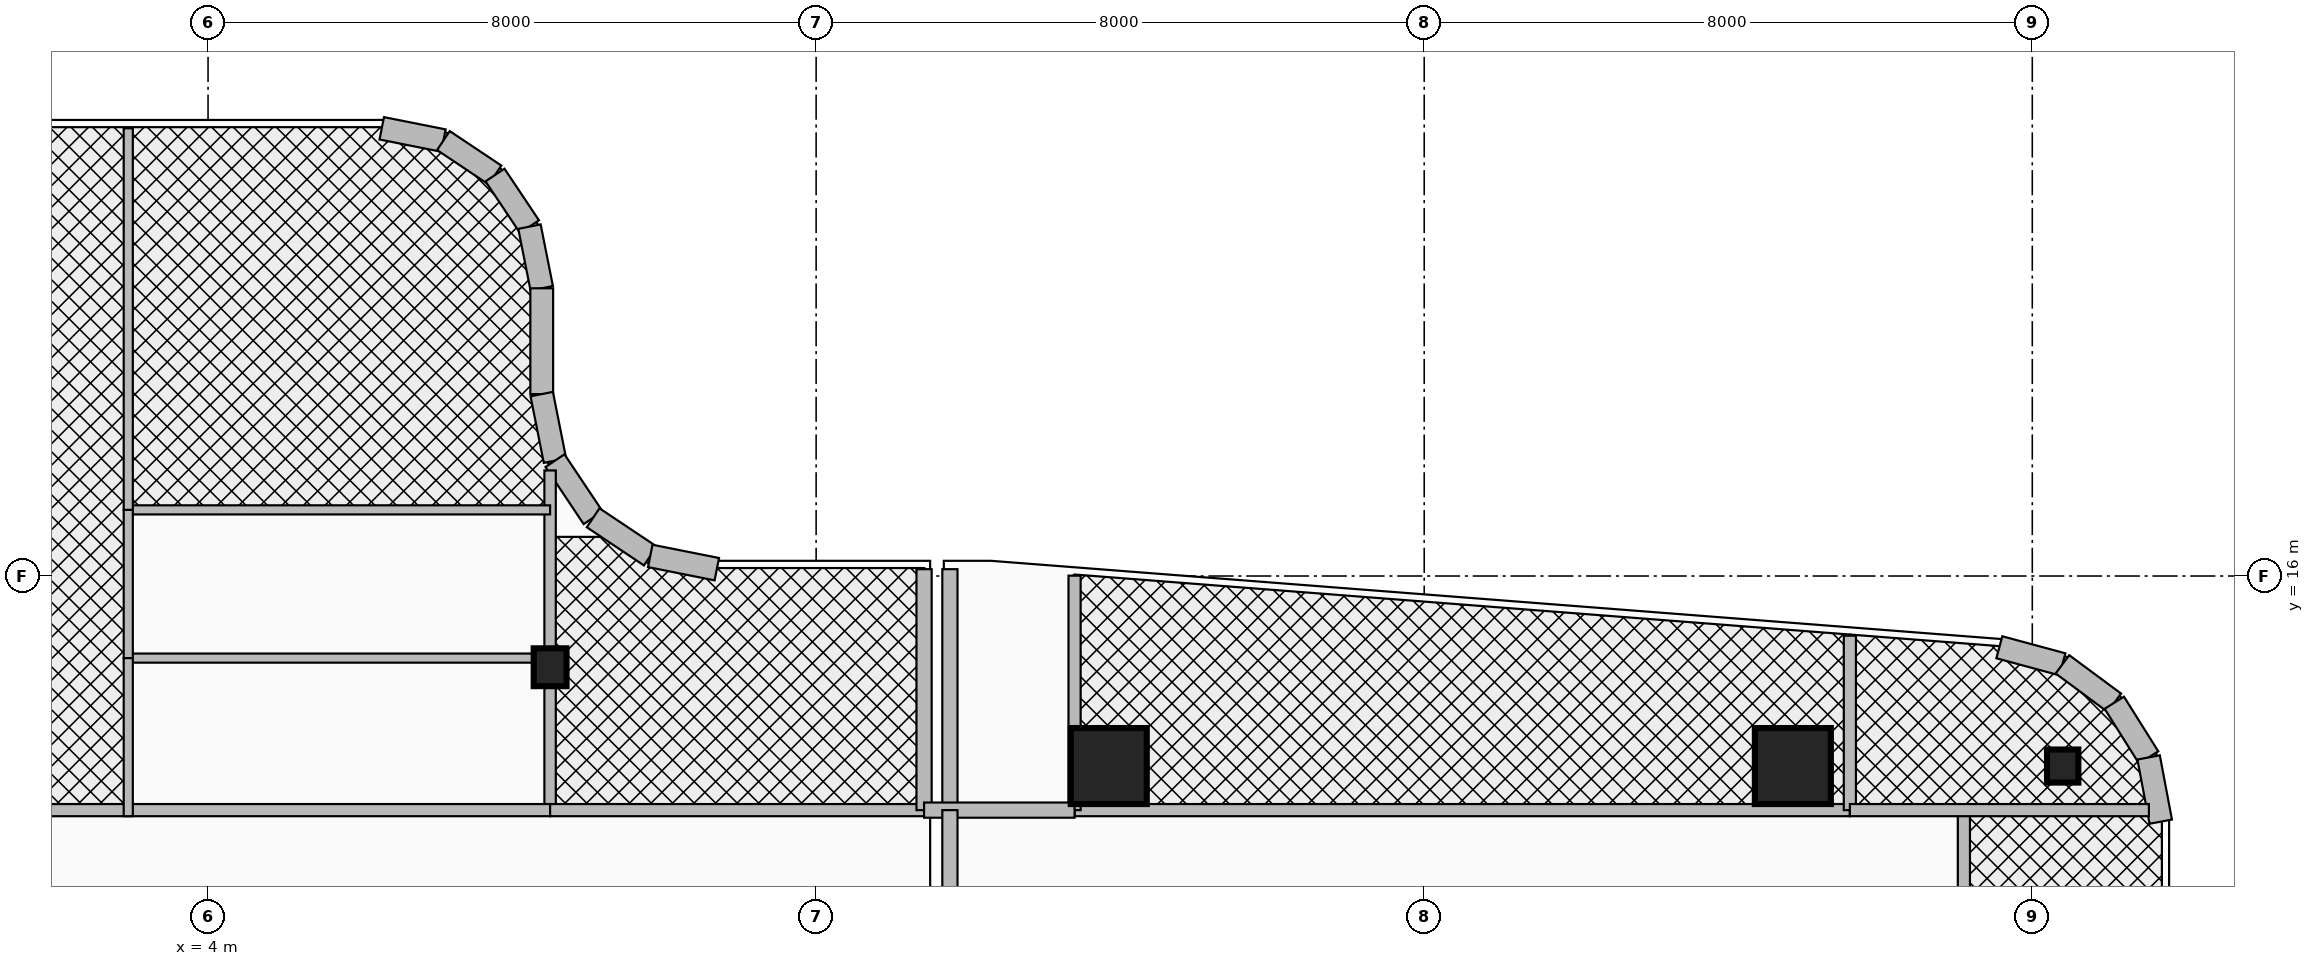
"""IFC4 building model, lengths in metres.
Left out: names, types, materials, properties, quantities, classifications, styles, units other than length and angle.
Written with IfcOpenShell. Run it as: python <this file> out.ifc"""

import sys

from ifc_helpers import new_model, si_unit, direction, frame, frame_2d, origin, origin_2d, place, context, subcontext, project, spatial, rectangle, i_section, extrude, source, transform, mapped, element, fill, save


model = new_model("IFC4")
c1 = context("Model", 3, precision=1e-05, world=origin(), true_north=direction((0.0, 1.0)))
c2 = subcontext(c1, "Body", "Model", "MODEL_VIEW")
j1 = project(units=[si_unit("LENGTHUNIT", "METRE"), si_unit("PLANEANGLEUNIT", "RADIAN")], contexts=[c1])
p1 = place(None, origin())
s1 = spatial("IfcSite", under=j1, at=p1, CompositionType="ELEMENT")
p2 = place(p1, origin())
s2 = spatial("IfcBuilding", under=s1, at=p2, CompositionType="ELEMENT")
p3 = place(p2, frame((0.0, 0.0, 180.5)))
s3 = spatial("IfcBuildingStorey", under=s2, at=p3, CompositionType="ELEMENT", Elevation=180.5)
m1 = source(origin(), c2, "Body", "SweptSolid", [
    extrude(rectangle(XDim=1.0, YDim=1.0, at=origin_2d()), origin(), (0.0, 0.0, 1.0), 3.95),
])
for number, where, z_axis, x_axis in (
    (1, (15.85, 13.5, 0.0), (0.0, 0.0, 1.0), (1.0, 0.0, 0.0)),
    (2, (24.85, 13.5, 0.0), (0.0, 0.0, 1.0), (1.0, 0.0, 0.0)),
):
    element("IfcColumn", number, at=place(p3, frame(where, z_axis=z_axis, x_axis=x_axis)), inside=s3, PredefinedType="COLUMN", context=c2, shape_type="MappedRepresentation", body=[
        mapped(m1, transform((0.0, 0.0, 0.0), x_axis=(1.0, 0.0, 0.0), y_axis=(0.0, 1.0, 0.0), z_axis=(0.0, 0.0, 1.0), scale=1.0)),
    ])
m2 = source(origin(), c2, "Body", "SweptSolid", [
    extrude(i_section(OverallWidth=0.412, OverallDepth=0.435, WebThickness=0.036, FlangeThickness=0.057, at=origin_2d()), origin(), (0.0, 0.0, 1.0), 3.95),
])
p4 = place(p3, frame((28.4, 13.5, 0.0), z_axis=(0.0, 0.0, 1.0), x_axis=(1.0, 0.0, 0.0)))
e3 = element("IfcColumn", 3, at=p4, inside=s3, PredefinedType="COLUMN", context=c2, shape_type="MappedRepresentation", body=[
    mapped(m2, transform((0.0, 0.0, 0.0), x_axis=(1.0, 0.0, 0.0), y_axis=(0.0, 1.0, 0.0), z_axis=(0.0, 0.0, 1.0), scale=1.0)),
])
m3 = source(origin(), c2, "Body", "SweptSolid", [
    extrude(i_section(OverallWidth=0.432, OverallDepth=0.498, WebThickness=0.056, FlangeThickness=0.089, at=origin_2d()), origin(), (0.0, 0.0, 1.0), 3.95),
])
p5 = place(p3, frame((8.5, 14.8, 0.0), z_axis=(0.0, 0.0, 1.0), x_axis=(1.0, 0.0, 0.0)))
e4 = element("IfcColumn", 4, at=p5, inside=s3, PredefinedType="COLUMN", context=c2, shape_type="MappedRepresentation", body=[
    mapped(m3, transform((0.0, 0.0, 0.0), x_axis=(1.0, 0.0, 0.0), y_axis=(0.0, 1.0, 0.0), z_axis=(0.0, 0.0, 1.0), scale=1.0)),
])
p6 = place(p3, frame((6.285, 21.89, 0.0), z_axis=(0.0, 0.0, 1.0), x_axis=(0.980784478276, -0.195094354541, 0.0)))
e5 = element("IfcWall", 5, at=p6, inside=s3, PredefinedType="SOLIDWALL", context=c2, shape_type="SweptSolid", body=[
    extrude(rectangle(XDim=0.827, YDim=0.3, at=frame_2d((0.414, 0.0))), origin(), (0.0, 0.0, 1.0), 3.076),
])
p7 = place(p3, frame((7.096, 21.729, 0.0), z_axis=(0.0, 0.0, 1.0), x_axis=(0.831543750805, -0.55545926088, 0.0)))
e6 = element("IfcWall", 6, at=p7, inside=s3, PredefinedType="SOLIDWALL", context=c2, shape_type="SweptSolid", body=[
    extrude(rectangle(XDim=0.816, YDim=0.3, at=frame_2d((0.408, 0.0))), origin(), (0.0, 0.0, 1.0), 3.63),
])
p8 = place(p3, frame((7.775, 21.275, 0.0), z_axis=(0.0, 0.0, 1.0), x_axis=(0.55545926088, -0.831543750805, 0.0)))
e7 = element("IfcWall", 7, at=p8, inside=s3, PredefinedType="SOLIDWALL", context=c2, shape_type="SweptSolid", body=[
    extrude(rectangle(XDim=0.816, YDim=0.3, at=frame_2d((0.408, 0.0))), origin(), (0.0, 0.0, 1.0), 2.615),
])
p9 = place(p3, frame((8.229, 20.596, 0.0), z_axis=(0.0, 0.0, 1.0), x_axis=(0.195094354541, -0.980784478276, 0.0)))
e8 = element("IfcWall", 8, at=p9, inside=s3, PredefinedType="SOLIDWALL", context=c2, shape_type="SweptSolid", body=[
    extrude(rectangle(XDim=0.827, YDim=0.3, at=frame_2d((0.414, 0.0))), origin(), (0.0, 0.0, 1.0), 2.615),
])
p10 = place(p3, frame((8.39, 19.785, 0.0), z_axis=(0.0, 0.0, 1.0), x_axis=(0.0, -1.0, 0.0)))
e9 = element("IfcWall", 9, at=p10, inside=s3, PredefinedType="SOLIDWALL", context=c2, shape_type="SweptSolid", body=[
    extrude(rectangle(XDim=1.392, YDim=0.3, at=frame_2d((0.696, 0.0))), origin(), (0.0, 0.0, 1.0), 2.615),
])
p11 = place(p3, frame((8.39, 18.393, 0.0), z_axis=(0.0, 0.0, 1.0), x_axis=(0.195222179208, -0.980759043163, 0.0)))
e10 = element("IfcWall", 10, at=p11, inside=s3, PredefinedType="SOLIDWALL", context=c2, shape_type="SweptSolid", body=[
    extrude(rectangle(XDim=0.893, YDim=0.3, at=frame_2d((0.446, 0.0))), origin(), (0.0, 0.0, 1.0), 2.615),
])
for number, where, z_axis, x_axis in (
    (11, (8.564, 17.518, 0.0), (0.0, 0.0, 1.0), (0.555, -0.832, 0.0)),
    (12, (9.066, 16.766, 0.0), (0.0, 0.0, 1.0), (0.832, -0.555, 0.0)),
):
    element("IfcWall", number, at=place(p3, frame(where, z_axis=z_axis, x_axis=x_axis)), inside=s3, PredefinedType="SOLIDWALL", context=c2, shape_type="SweptSolid", body=[
        extrude(rectangle(XDim=0.904, YDim=0.3, at=frame_2d((0.452, 0.0))), origin(), (0.0, 0.0, 1.0), 2.615),
    ])
p12 = place(p3, frame((9.818, 16.264, 0.0), z_axis=(0.0, 0.0, 1.0), x_axis=(0.980800964186, -0.195011457743, 0.0)))
e13 = element("IfcWall", 13, at=p12, inside=s3, PredefinedType="SOLIDWALL", context=c2, shape_type="SweptSolid", body=[
    extrude(rectangle(XDim=0.893, YDim=0.3, at=frame_2d((0.446, 0.0))), origin(), (0.0, 0.0, 1.0), 3.63),
])
p13 = place(p3, frame((27.566, 15.062, 0.0), z_axis=(0.0, 0.0, 1.0), x_axis=(0.965357594382, -0.260930479187, 0.0)))
e14 = element("IfcWall", 14, at=p13, inside=s3, PredefinedType="SOLIDWALL", context=c2, shape_type="SweptSolid", body=[
    extrude(rectangle(XDim=0.86, YDim=0.3, at=frame_2d((0.43, 0.0))), origin(), (0.0, 0.0, 1.0), 3.63),
])
p14 = place(p3, frame((28.396, 14.838, 0.0), z_axis=(0.0, 0.0, 1.0), x_axis=(0.803847397988, -0.594835574548, 0.0)))
e15 = element("IfcWall", 15, at=p14, inside=s3, PredefinedType="SOLIDWALL", context=c2, shape_type="SweptSolid", body=[
    extrude(rectangle(XDim=0.849, YDim=0.3, at=frame_2d((0.425, 0.0))), origin(), (0.0, 0.0, 1.0), 3.63),
])
p15 = place(p3, frame((29.079, 14.333, 0.0), z_axis=(0.0, 0.0, 1.0), x_axis=(0.53134147342, -0.847157741288, 0.0)))
e16 = element("IfcWall", 16, at=p15, inside=s3, PredefinedType="SOLIDWALL", context=c2, shape_type="SweptSolid", body=[
    extrude(rectangle(XDim=0.85, YDim=0.3, at=frame_2d((0.425, 0.0))), origin(), (0.0, 0.0, 1.0), 3.63),
])
p16 = place(p3, frame((29.531, 13.613, 0.0), z_axis=(0.0, 0.0, 1.0), x_axis=(0.185402686284, -0.982662629756, 0.0)))
e17 = element("IfcWall", 17, at=p16, inside=s3, PredefinedType="SOLIDWALL", context=c2, shape_type="SweptSolid", body=[
    extrude(rectangle(XDim=0.86, YDim=0.3, at=frame_2d((0.43, 0.0))), origin(), (0.0, 0.0, 1.0), 3.63),
])
p17 = place(p3, frame((8.5, 12.92, 0.0), z_axis=(0.0, 0.0, 1.0), x_axis=(0.0, 1.0, 0.0)))
e18 = element("IfcWall", 18, at=p17, inside=s3, PredefinedType="PARTITIONING", context=c2, shape_type="SweptSolid", body=[
    extrude(rectangle(XDim=4.469, YDim=0.15, at=frame_2d((2.234, 0.0))), origin(), (0.0, 0.0, 1.0), 2.615),
])
p18 = place(p3, frame((-28.25, 12.92, 0.0), z_axis=(0.0, 0.0, 1.0), x_axis=(1.0, 0.0, 0.0)))
e19 = element("IfcWall", 19, at=p18, inside=s3, PredefinedType="PARTITIONING", context=c2, shape_type="SweptSolid", body=[
    extrude(rectangle(XDim=36.75, YDim=0.16, at=frame_2d((18.375, 0.0))), origin(), (0.0, 0.0, 1.0), 2.615),
])
p19 = place(p18, frame((1.386, 0.0, 0.0)))
e20 = element("IfcOpeningElement", 20, at=p19, cuts=e19, PredefinedType="OPENING", context=c2, shape_type="SweptSolid", body=[
    extrude(rectangle(XDim=0.95, YDim=2.15, at=frame_2d((0.475, 1.075))), frame((0.0, 0.095, 0.0), z_axis=(0.0, -1.0, 0.0), x_axis=(1.0, 0.0, 0.0)), (0.0, 0.0, 1.0), 0.19),
])
p20 = place(p18, frame((5.327, 0.0, 0.0)))
e21 = element("IfcOpeningElement", 21, at=p20, cuts=e19, PredefinedType="OPENING", context=c2, shape_type="SweptSolid", body=[
    extrude(rectangle(XDim=0.95, YDim=2.15, at=frame_2d((0.475, 1.075))), frame((0.0, 0.095, 0.0), z_axis=(0.0, -1.0, 0.0), x_axis=(1.0, 0.0, 0.0)), (0.0, 0.0, 1.0), 0.19),
])
p21 = place(p18, frame((13.5, 0.0, 0.0)))
e22 = element("IfcOpeningElement", 22, at=p21, cuts=e19, PredefinedType="OPENING", context=c2, shape_type="SweptSolid", body=[
    extrude(rectangle(XDim=0.95, YDim=2.15, at=frame_2d((0.475, 1.075))), frame((0.0, 0.095, 0.0), z_axis=(0.0, -1.0, 0.0), x_axis=(1.0, 0.0, 0.0)), (0.0, 0.0, 1.0), 0.19),
])
p22 = place(p18, frame((26.834, 0.0, 0.0)))
e23 = element("IfcOpeningElement", 23, at=p22, cuts=e19, PredefinedType="OPENING", context=c2, shape_type="SweptSolid", body=[
    extrude(rectangle(XDim=0.95, YDim=2.15, at=frame_2d((0.475, 1.075))), frame((0.0, 0.095, 0.0), z_axis=(0.0, -1.0, 0.0), x_axis=(1.0, 0.0, 0.0)), (0.0, 0.0, 1.0), 0.19),
])
for number, where, z_axis, x_axis in (
    (24, (2.95, 14.92, 0.0), (0.0, 0.0, 1.0), (1.0, 0.0, 0.0)),
    (25, (2.95, 16.87, 0.0), (0.0, 0.0, 1.0), (1.0, 0.0, 0.0)),
):
    element("IfcWall", number, at=place(p3, frame(where, z_axis=z_axis, x_axis=x_axis)), inside=s3, PredefinedType="PARTITIONING", context=c2, shape_type="SweptSolid", body=[
        extrude(rectangle(XDim=5.55, YDim=0.12, at=frame_2d((2.775, 0.0))), origin(), (0.0, 0.0, 1.0), 2.615),
    ])
p23 = place(p3, frame((2.95, 14.92, 0.0), z_axis=(0.0, 0.0, 1.0), x_axis=(0.0, 1.0, 0.0)))
e26 = element("IfcWall", 26, at=p23, inside=s3, PredefinedType="PARTITIONING", context=c2, shape_type="SweptSolid", body=[
    extrude(rectangle(XDim=1.95, YDim=0.12, at=frame_2d((0.975, 0.0))), origin(), (0.0, 0.0, 1.0), 2.665),
])
p24 = place(p23, frame((0.55, 0.0, 0.0)))
e27 = element("IfcOpeningElement", 27, at=p24, cuts=e26, PredefinedType="OPENING", context=c2, shape_type="SweptSolid", body=[
    extrude(rectangle(XDim=0.85, YDim=2.1, at=frame_2d((0.425, 1.05))), frame((0.0, 0.075, 0.0), z_axis=(0.0, -1.0, 0.0), x_axis=(1.0, 0.0, 0.0)), (0.0, 0.0, 1.0), 0.15),
])
p25 = place(p3, frame((2.95, 12.84, 0.0), z_axis=(0.0, 0.0, 1.0), x_axis=(0.0, 1.0, 0.0)))
e28 = element("IfcWall", 28, at=p25, inside=s3, PredefinedType="PARTITIONING", context=c2, shape_type="SweptSolid", body=[
    extrude(rectangle(XDim=2.08, YDim=0.12, at=frame_2d((1.04, 0.0))), origin(), (0.0, 0.0, 1.0), 2.665),
])
p26 = place(p25, frame((0.55, 0.0, 0.0)))
e29 = element("IfcOpeningElement", 29, at=p26, cuts=e28, PredefinedType="OPENING", context=c2, shape_type="SweptSolid", body=[
    extrude(rectangle(XDim=0.9, YDim=2.1, at=frame_2d((0.45, 1.05))), frame((0.0, 0.075, 0.0), z_axis=(0.0, -1.0, 0.0), x_axis=(1.0, 0.0, 0.0)), (0.0, 0.0, 1.0), 0.15),
])
p27 = place(p3, frame((2.95, 16.87, 0.0), z_axis=(0.0, 0.0, 1.0), x_axis=(0.0, 1.0, 0.0)))
e30 = element("IfcWall", 30, at=p27, inside=s3, PredefinedType="PARTITIONING", context=c2, shape_type="SweptSolid", body=[
    extrude(rectangle(XDim=5.02, YDim=0.12, at=frame_2d((2.51, 0.0))), origin(), (0.0, 0.0, 1.0), 3.076),
])
p28 = place(p27, frame((2.06, 0.0, 0.0)))
e31 = element("IfcOpeningElement", 31, at=p28, cuts=e30, PredefinedType="OPENING", context=c2, shape_type="SweptSolid", body=[
    extrude(rectangle(XDim=0.9, YDim=2.1, at=frame_2d((0.45, 1.05))), frame((0.0, 0.075, 0.0), z_axis=(0.0, -1.0, 0.0), x_axis=(1.0, 0.0, 0.0)), (0.0, 0.0, 1.0), 0.15),
])
p29 = place(p3, frame((8.5, 12.92, 0.0), z_axis=(0.0, 0.0, 1.0), x_axis=(1.0, 0.0, 0.0)))
e32 = element("IfcWall", 32, at=p29, inside=s3, PredefinedType="PARTITIONING", context=c2, shape_type="SweptSolid", body=[
    extrude(rectangle(XDim=4.92, YDim=0.16, at=frame_2d((2.46, 0.0))), origin(), (0.0, 0.0, 1.0), 2.615),
])
p30 = place(p29, frame((1.8, 0.0, 0.0)))
e33 = element("IfcOpeningElement", 33, at=p30, cuts=e32, PredefinedType="OPENING", context=c2, shape_type="SweptSolid", body=[
    extrude(rectangle(XDim=0.9, YDim=2.1, at=frame_2d((0.45, 1.05))), frame((0.0, 0.095, 0.0), z_axis=(0.0, -1.0, 0.0), x_axis=(1.0, 0.0, 0.0)), (0.0, 0.0, 1.0), 0.19),
])
for number, where, z_axis, x_axis in (
    (34, (13.42, 12.92, 0.0), (0.0, 0.0, 1.0), (0.0, 1.0, 0.0)),
    (35, (13.76, 12.92, 0.0), (0.0, 0.0, 1.0), (0.0, 1.0, 0.0)),
):
    element("IfcWall", number, at=place(p3, frame(where, z_axis=z_axis, x_axis=x_axis)), inside=s3, PredefinedType="PARTITIONING", context=c2, shape_type="SweptSolid", body=[
        extrude(rectangle(XDim=3.17, YDim=0.2, at=frame_2d((1.585, 0.0))), origin(), (0.0, 0.0, 1.0), 2.665),
    ])
p31 = place(p3, frame((15.4, 12.92, 0.0), z_axis=(0.0, 0.0, 1.0), x_axis=(1.0, 0.0, 0.0)))
e36 = element("IfcWall", 36, at=p31, inside=s3, PredefinedType="PARTITIONING", context=c2, shape_type="SweptSolid", body=[
    extrude(rectangle(XDim=10.2, YDim=0.16, at=frame_2d((5.1, 0.0))), origin(), (0.0, 0.0, 1.0), 3.004),
])
p32 = place(p31, frame((4.65, 0.0, 0.0)))
e37 = element("IfcOpeningElement", 37, at=p32, cuts=e36, PredefinedType="OPENING", context=c2, shape_type="SweptSolid", body=[
    extrude(rectangle(XDim=0.9, YDim=2.1, at=frame_2d((0.45, 1.05))), frame((0.0, 0.095, 0.0), z_axis=(0.0, -1.0, 0.0), x_axis=(1.0, 0.0, 0.0)), (0.0, 0.0, 1.0), 0.19),
])
p33 = place(p3, frame((15.4, 12.92, 0.0), z_axis=(0.0, 0.0, 1.0), x_axis=(0.0, 1.0, 0.0)))
e38 = element("IfcWall", 38, at=p33, inside=s3, PredefinedType="PARTITIONING", context=c2, shape_type="SweptSolid", body=[
    extrude(rectangle(XDim=3.084, YDim=0.16, at=frame_2d((1.542, 0.0))), origin(), (0.0, 0.0, 1.0), 2.665),
])
p34 = place(p3, frame((25.6, 12.92, 0.0), z_axis=(0.0, 0.0, 1.0), x_axis=(0.0, 1.0, 0.0)))
e39 = element("IfcWall", 39, at=p34, inside=s3, PredefinedType="PARTITIONING", context=c2, shape_type="SweptSolid", body=[
    extrude(rectangle(XDim=2.295, YDim=0.16, at=frame_2d((1.147, 0.0))), origin(), (0.0, 0.0, 1.0), 2.665),
])
p35 = place(p3, frame((27.1, -11.89, 0.0), z_axis=(0.0, 0.0, 1.0), x_axis=(0.0, 1.0, 0.0)))
e40 = element("IfcWall", 40, at=p35, inside=s3, PredefinedType="PARTITIONING", context=c2, shape_type="SweptSolid", body=[
    extrude(rectangle(XDim=24.81, YDim=0.16, at=frame_2d((12.405, 0.0))), origin(), (0.0, 0.0, 1.0), 2.665),
])
p36 = place(p35, frame((4.525, 0.0, 0.0)))
e41 = element("IfcOpeningElement", 41, at=p36, cuts=e40, PredefinedType="OPENING", context=c2, shape_type="SweptSolid", body=[
    extrude(rectangle(XDim=1.8, YDim=2.15, at=frame_2d((0.9, 1.075))), frame((0.0, 0.095, 0.0), z_axis=(0.0, -1.0, 0.0), x_axis=(1.0, 0.0, 0.0)), (0.0, 0.0, 1.0), 0.19),
])
p37 = place(p35, frame((16.93, 0.0, 0.0)))
e42 = element("IfcOpeningElement", 42, at=p37, cuts=e40, PredefinedType="OPENING", context=c2, shape_type="SweptSolid", body=[
    extrude(rectangle(XDim=1.8, YDim=2.15, at=frame_2d((0.9, 1.075))), frame((0.0, 0.095, 0.0), z_axis=(0.0, -1.0, 0.0), x_axis=(1.0, 0.0, 0.0)), (0.0, 0.0, 1.0), 0.19),
])
p38 = place(p3, frame((25.6, 12.92, 0.0), z_axis=(0.0, 0.0, 1.0), x_axis=(1.0, 0.0, 0.0)))
e43 = element("IfcWall", 43, at=p38, inside=s3, PredefinedType="PARTITIONING", context=c2, shape_type="SweptSolid", body=[
    extrude(rectangle(XDim=3.934, YDim=0.16, at=frame_2d((1.967, 0.0))), origin(), (0.0, 0.0, 1.0), 3.076),
])
p39 = place(p38, frame((0.3, 0.0, 0.0)))
e44 = element("IfcOpeningElement", 44, at=p39, cuts=e43, PredefinedType="OPENING", context=c2, shape_type="SweptSolid", body=[
    extrude(rectangle(XDim=0.9, YDim=2.1, at=frame_2d((0.45, 1.05))), frame((0.0, 0.095, 0.0), z_axis=(0.0, -1.0, 0.0), x_axis=(1.0, 0.0, 0.0)), (0.0, 0.0, 1.0), 0.19),
])
p40 = place(p3, frame((13.42, 12.92, 0.0), z_axis=(0.0, 0.0, 1.0), x_axis=(1.0, 0.0, 0.0)))
e45 = element("IfcWall", 45, at=p40, inside=s3, PredefinedType="PARTITIONING", context=c2, shape_type="SweptSolid", body=[
    extrude(rectangle(XDim=1.98, YDim=0.2, at=frame_2d((0.99, 0.0))), origin(), (0.0, 0.0, 1.0), 3.004),
])
p41 = place(p3, frame((13.76, 11.42, 0.0), z_axis=(0.0, 0.0, 1.0), x_axis=(0.0, 1.0, 0.0)))
e46 = element("IfcWall", 46, at=p41, inside=s3, PredefinedType="PARTITIONING", context=c2, shape_type="SweptSolid", body=[
    extrude(rectangle(XDim=1.5, YDim=0.2, at=frame_2d((0.75, 0.0))), origin(), (0.0, 0.0, 1.0), 3.004),
])
p42 = place(p41, frame((0.225, 0.0, 0.0)))
e47 = element("IfcOpeningElement", 47, at=p42, cuts=e46, PredefinedType="OPENING", context=c2, shape_type="SweptSolid", body=[
    extrude(rectangle(XDim=1.05, YDim=2.15, at=frame_2d((0.525, 1.075))), frame((0.0, 0.115, 0.0), z_axis=(0.0, -1.0, 0.0), x_axis=(1.0, 0.0, 0.0)), (0.0, 0.0, 1.0), 0.23),
])
p43 = place(p24, origin())
e48 = element("IfcDoor", 48, at=p43, inside=s3, OperationType="SINGLE_SWING_RIGHT", PredefinedType="DOOR", context=c2, shape_type="SweptSolid", body=[
    extrude(rectangle(XDim=0.85, YDim=2.1, at=frame_2d((0.425, 1.05))), frame((0.0, 0.025, 0.0), z_axis=(0.0, -1.0, 0.0), x_axis=(1.0, 0.0, 0.0)), (0.0, 0.0, 1.0), 0.05),
])
fill(e27, e48)
p44 = place(p26, origin())
e49 = element("IfcDoor", 49, at=p44, inside=s3, OperationType="SINGLE_SWING_LEFT", PredefinedType="DOOR", context=c2, shape_type="SweptSolid", body=[
    extrude(rectangle(XDim=0.9, YDim=2.1, at=frame_2d((0.45, 1.05))), frame((0.0, 0.025, 0.0), z_axis=(0.0, -1.0, 0.0), x_axis=(1.0, 0.0, 0.0)), (0.0, 0.0, 1.0), 0.05),
])
fill(e29, e49)
p45 = place(p28, origin())
e50 = element("IfcDoor", 50, at=p45, inside=s3, OperationType="SINGLE_SWING_RIGHT", PredefinedType="DOOR", context=c2, shape_type="SweptSolid", body=[
    extrude(rectangle(XDim=0.9, YDim=2.1, at=frame_2d((0.45, 1.05))), frame((0.0, 0.025, 0.0), z_axis=(0.0, -1.0, 0.0), x_axis=(1.0, 0.0, 0.0)), (0.0, 0.0, 1.0), 0.05),
])
fill(e31, e50)
p46 = place(p30, origin())
e51 = element("IfcDoor", 51, at=p46, inside=s3, OperationType="SINGLE_SWING_RIGHT", PredefinedType="DOOR", context=c2, shape_type="SweptSolid", body=[
    extrude(rectangle(XDim=0.9, YDim=2.1, at=frame_2d((0.45, 1.05))), frame((0.0, 0.025, 0.0), z_axis=(0.0, -1.0, 0.0), x_axis=(1.0, 0.0, 0.0)), (0.0, 0.0, 1.0), 0.05),
])
fill(e33, e51)
p47 = place(p32, frame((0.9, 0.0, 0.0), z_axis=(0.0, 0.0, 1.0), x_axis=(-1.0, 0.0, 0.0)))
e52 = element("IfcDoor", 52, at=p47, inside=s3, OperationType="SINGLE_SWING_LEFT", PredefinedType="DOOR", context=c2, shape_type="SweptSolid", body=[
    extrude(rectangle(XDim=0.9, YDim=2.1, at=frame_2d((0.45, 1.05))), frame((0.0, 0.025, 0.0), z_axis=(0.0, -1.0, 0.0), x_axis=(1.0, 0.0, 0.0)), (0.0, 0.0, 1.0), 0.05),
])
fill(e37, e52)
p48 = place(p39, origin())
e53 = element("IfcDoor", 53, at=p48, inside=s3, OperationType="SINGLE_SWING_LEFT", PredefinedType="DOOR", context=c2, shape_type="SweptSolid", body=[
    extrude(rectangle(XDim=0.9, YDim=2.1, at=frame_2d((0.45, 1.05))), frame((0.0, 0.025, 0.0), z_axis=(0.0, -1.0, 0.0), x_axis=(1.0, 0.0, 0.0)), (0.0, 0.0, 1.0), 0.05),
])
fill(e44, e53)
p49 = place(p42, origin())
e54 = element("IfcDoor", 54, at=p49, inside=s3, OperationType="SINGLE_SWING_RIGHT", PredefinedType="DOOR", context=c2, shape_type="SweptSolid", body=[
    extrude(rectangle(XDim=1.05, YDim=2.15, at=frame_2d((0.525, 1.075))), frame((0.0, 0.025, 0.0), z_axis=(0.0, -1.0, 0.0), x_axis=(1.0, 0.0, 0.0)), (0.0, 0.0, 1.0), 0.05),
])
fill(e47, e54)
save(model, sys.argv[1])
